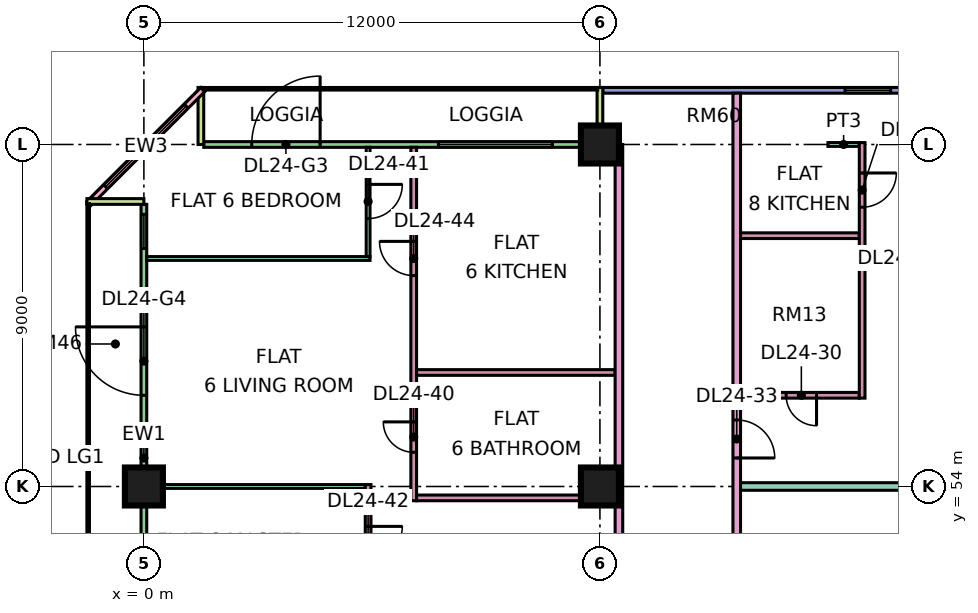
"""IFC4 building model, lengths in metres.
Left out: names, types, materials, properties, quantities, classifications, styles, units other than length and angle.
Written with IfcOpenShell. Run it as: python <this file> out.ifc"""

import sys

from ifc_helpers import new_model, si_unit, direction, frame, frame_2d, origin, origin_2d, place, context, subcontext, project, spatial, rectangle, extrude, element, fill, save


model = new_model("IFC4")
c1 = context("Model", 3, precision=1e-05, world=origin(), true_north=direction((0.0, 1.0)))
c2 = subcontext(c1, "Body", "Model", "MODEL_VIEW")
j1 = project(units=[si_unit("LENGTHUNIT", "METRE"), si_unit("PLANEANGLEUNIT", "RADIAN")], contexts=[c1])
p1 = place(None, origin())
s1 = spatial("IfcSite", under=j1, at=p1, CompositionType="ELEMENT")
p2 = place(p1, origin())
s2 = spatial("IfcBuilding", under=s1, at=p2, CompositionType="ELEMENT")
p3 = place(p2, frame((0.0, 0.0, 106.9)))
s3 = spatial("IfcBuildingStorey", under=s2, at=p3, CompositionType="ELEMENT", Elevation=106.9)
for number, where, z_axis, x_axis in (
    (1, (0.0, 54.0, 0.0), (0.0, 0.0, 1.0), (1.0, 0.0, 0.0)),
    (2, (12.0, 54.0, 0.0), (0.0, 0.0, 1.0), (1.0, 0.0, 0.0)),
    (3, (12.0, 63.0, 0.0), (0.0, 0.0, 1.0), (1.0, 0.0, 0.0)),
):
    element("IfcColumn", number, at=place(p3, frame(where, z_axis=z_axis, x_axis=x_axis)), inside=s3, PredefinedType="COLUMN", context=c2, shape_type="SweptSolid", body=[
        extrude(rectangle(XDim=1.0, YDim=1.0, at=origin_2d()), origin(), (0.0, 0.0, 1.0), 3.75),
    ])
p4 = place(p3, frame((22.5, 64.425, 0.0), z_axis=(0.0, 0.0, 1.0), x_axis=(-1.0, 0.0, 0.0)))
e4 = element("IfcWall", 4, at=p4, inside=s3, PredefinedType="SOLIDWALL", context=c2, shape_type="SweptSolid", body=[
    extrude(rectangle(XDim=10.425, YDim=0.15, at=frame_2d((5.212, 0.0))), origin(), (0.0, 0.0, 1.0), 3.35),
])
p5 = place(p4, frame((0.6, 0.0, 0.45)))
e5 = element("IfcOpeningElement", 5, at=p5, cuts=e4, PredefinedType="OPENING", context=c2, shape_type="SweptSolid", body=[
    extrude(rectangle(XDim=1.2, YDim=2.4, at=frame_2d((0.6, 1.2))), frame((0.0, 0.085, 0.0), z_axis=(0.0, -1.0, 0.0), x_axis=(1.0, 0.0, 0.0)), (0.0, 0.0, 1.0), 0.17),
])
p6 = place(p4, frame((2.85, 0.0, 0.45)))
e6 = element("IfcOpeningElement", 6, at=p6, cuts=e4, PredefinedType="OPENING", context=c2, shape_type="SweptSolid", body=[
    extrude(rectangle(XDim=1.2, YDim=2.4, at=frame_2d((0.6, 1.2))), frame((0.0, 0.085, 0.0), z_axis=(0.0, -1.0, 0.0), x_axis=(1.0, 0.0, 0.0)), (0.0, 0.0, 1.0), 0.17),
])
p7 = place(p3, frame((11.925, 63.0, 0.0), z_axis=(0.0, 0.0, 1.0), x_axis=(-1.0, 0.0, 0.0)))
e7 = element("IfcWall", 7, at=p7, inside=s3, PredefinedType="SOLIDWALL", context=c2, shape_type="SweptSolid", body=[
    extrude(rectangle(XDim=10.35, YDim=0.15, at=frame_2d((5.175, 0.0))), origin(), (0.0, 0.0, 1.0), 3.35),
])
p8 = place(p7, frame((1.175, 0.0, 0.45)))
e8 = element("IfcOpeningElement", 8, at=p8, cuts=e7, PredefinedType="OPENING", context=c2, shape_type="SweptSolid", body=[
    extrude(rectangle(XDim=3.0, YDim=2.4, at=frame_2d((1.5, 1.2))), frame((0.0, 0.085, 0.0), z_axis=(0.0, -1.0, 0.0), x_axis=(1.0, 0.0, 0.0)), (0.0, 0.0, 1.0), 0.17),
])
p9 = place(p7, frame((7.288, 0.0, 0.0)))
e9 = element("IfcOpeningElement", 9, at=p9, cuts=e7, PredefinedType="OPENING", context=c2, shape_type="SweptSolid", body=[
    extrude(rectangle(XDim=1.8, YDim=2.4, at=frame_2d((0.9, 1.2))), frame((0.0, 0.085, 0.0), z_axis=(0.0, -1.0, 0.0), x_axis=(1.0, 0.0, 0.0)), (0.0, 0.0, 1.0), 0.17),
])
for number, where, z_axis, x_axis in (
    (10, (12.0, 64.5, 0.0), (0.0, 0.0, 1.0), (0.0, -1.0, 0.0)),
    (11, (1.5, 64.5, 0.0), (0.0, 0.0, 1.0), (0.0, -1.0, 0.0)),
):
    element("IfcWall", number, at=place(p3, frame(where, z_axis=z_axis, x_axis=x_axis)), inside=s3, PredefinedType="SOLIDWALL", context=c2, shape_type="SweptSolid", body=[
        extrude(rectangle(XDim=1.5, YDim=0.15, at=frame_2d((0.75, 0.0))), origin(), (0.0, 0.0, 1.0), 3.35),
    ])
p10 = place(p3, frame((1.553, 64.447, 0.0), z_axis=(0.0, 0.0, 1.0), x_axis=(-0.707106781187, -0.707106781187, 0.0)))
e12 = element("IfcWall", 12, at=p10, inside=s3, PredefinedType="SOLIDWALL", context=c2, shape_type="SweptSolid", body=[
    extrude(rectangle(XDim=4.243, YDim=0.15, at=frame_2d((2.121, 0.0))), origin(), (0.0, 0.0, 1.0), 3.35),
])
p11 = place(p10, frame((0.621, 0.0, 0.45)))
e13 = element("IfcOpeningElement", 13, at=p11, cuts=e12, PredefinedType="OPENING", context=c2, shape_type="SweptSolid", body=[
    extrude(rectangle(XDim=3.0, YDim=2.4, at=frame_2d((1.5, 1.2))), frame((0.0, 0.085, 0.0), z_axis=(0.0, -1.0, 0.0), x_axis=(1.0, 0.0, 0.0)), (0.0, 0.0, 1.0), 0.17),
])
p12 = place(p3, frame((0.0, 61.425, 0.0), z_axis=(0.0, 0.0, 1.0), x_axis=(0.0, -1.0, 0.0)))
e14 = element("IfcWall", 14, at=p12, inside=s3, PredefinedType="SOLIDWALL", context=c2, shape_type="SweptSolid", body=[
    extrude(rectangle(XDim=13.35, YDim=0.15, at=frame_2d((6.675, 0.0))), origin(), (0.0, 0.0, 1.0), 3.35),
])
p13 = place(p12, frame((0.262, 0.0, 0.45)))
e15 = element("IfcOpeningElement", 15, at=p13, cuts=e14, PredefinedType="OPENING", context=c2, shape_type="SweptSolid", body=[
    extrude(rectangle(XDim=0.9, YDim=2.4, at=frame_2d((0.45, 1.2))), frame((0.0, 0.085, 0.0), z_axis=(0.0, -1.0, 0.0), x_axis=(1.0, 0.0, 0.0)), (0.0, 0.0, 1.0), 0.17),
])
p14 = place(p12, frame((3.225, 0.0, 0.0)))
e16 = element("IfcOpeningElement", 16, at=p14, cuts=e14, PredefinedType="OPENING", context=c2, shape_type="SweptSolid", body=[
    extrude(rectangle(XDim=1.8, YDim=2.4, at=frame_2d((0.9, 1.2))), frame((0.0, 0.085, 0.0), z_axis=(0.0, -1.0, 0.0), x_axis=(1.0, 0.0, 0.0)), (0.0, 0.0, 1.0), 0.17),
])
p15 = place(p12, frame((9.188, 0.0, 0.45)))
e17 = element("IfcOpeningElement", 17, at=p15, cuts=e14, PredefinedType="OPENING", context=c2, shape_type="SweptSolid", body=[
    extrude(rectangle(XDim=3.0, YDim=2.4, at=frame_2d((1.5, 1.2))), frame((0.0, 0.085, 0.0), z_axis=(0.0, -1.0, 0.0), x_axis=(1.0, 0.0, 0.0)), (0.0, 0.0, 1.0), 0.17),
])
p16 = place(p3, frame((-1.5, 61.5, 0.0), z_axis=(0.0, 0.0, 1.0), x_axis=(1.0, 0.0, 0.0)))
e18 = element("IfcWall", 18, at=p16, inside=s3, PredefinedType="SOLIDWALL", context=c2, shape_type="SweptSolid", body=[
    extrude(rectangle(XDim=1.5, YDim=0.15, at=frame_2d((0.75, 0.0))), origin(), (0.0, 0.0, 1.0), 3.35),
])
p17 = place(p3, frame((0.074, 54.0, 0.0), z_axis=(0.0, 0.0, 1.0), x_axis=(1.0, 0.0, 0.0)))
e19 = element("IfcWall", 19, at=p17, inside=s3, PredefinedType="PARTITIONING", context=c2, shape_type="SweptSolid", body=[
    extrude(rectangle(XDim=5.751, YDim=0.1, at=frame_2d((2.875, 0.0))), origin(), (0.0, 0.0, 1.0), 3.35),
])
p18 = place(p3, frame((0.074, 60.0, 0.0), z_axis=(0.0, 0.0, 1.0), x_axis=(1.0, 0.0, 0.0)))
e20 = element("IfcWall", 20, at=p18, inside=s3, PredefinedType="PARTITIONING", context=c2, shape_type="SweptSolid", body=[
    extrude(rectangle(XDim=5.876, YDim=0.1, at=frame_2d((2.938, 0.0))), origin(), (0.0, 0.0, 1.0), 3.35),
])
p19 = place(p3, frame((5.9, 48.1, 0.0), z_axis=(0.0, 0.0, 1.0), x_axis=(0.0, 1.0, 0.0)))
e21 = element("IfcWall", 21, at=p19, inside=s3, PredefinedType="PARTITIONING", context=c2, shape_type="SweptSolid", body=[
    extrude(rectangle(XDim=5.95, YDim=0.15, at=frame_2d((2.975, 0.0))), origin(), (0.0, 0.0, 1.0), 3.35),
])
p20 = place(p19, frame((3.95, 0.0, 0.0)))
e22 = element("IfcOpeningElement", 22, at=p20, cuts=e21, PredefinedType="OPENING", context=c2, shape_type="SweptSolid", body=[
    extrude(rectangle(XDim=0.9, YDim=2.1, at=frame_2d((0.45, 1.05))), frame((0.0, 0.085, 0.0), z_axis=(0.0, -1.0, 0.0), x_axis=(1.0, 0.0, 0.0)), (0.0, 0.0, 1.0), 0.17),
])
p21 = place(p3, frame((5.9, 60.05, 0.0), z_axis=(0.0, 0.0, 1.0), x_axis=(0.0, 1.0, 0.0)))
e23 = element("IfcWall", 23, at=p21, inside=s3, PredefinedType="PARTITIONING", context=c2, shape_type="SweptSolid", body=[
    extrude(rectangle(XDim=2.876, YDim=0.1, at=frame_2d((1.438, 0.0))), origin(), (0.0, 0.0, 1.0), 3.35),
])
p22 = place(p21, frame((1.0, 0.0, 0.0)))
e24 = element("IfcOpeningElement", 24, at=p22, cuts=e23, PredefinedType="OPENING", context=c2, shape_type="SweptSolid", body=[
    extrude(rectangle(XDim=0.9, YDim=2.1, at=frame_2d((0.45, 1.05))), frame((0.0, 0.06, 0.0), z_axis=(0.0, -1.0, 0.0), x_axis=(1.0, 0.0, 0.0)), (0.0, 0.0, 1.0), 0.12),
])
p23 = place(p3, frame((7.1, 53.625, 0.0), z_axis=(0.0, 0.0, 1.0), x_axis=(0.0, 1.0, 0.0)))
e25 = element("IfcWall", 25, at=p23, inside=s3, PredefinedType="PARTITIONING", context=c2, shape_type="SweptSolid", body=[
    extrude(rectangle(XDim=9.301, YDim=0.15, at=frame_2d((4.65, 0.0))), origin(), (0.0, 0.0, 1.0), 3.35),
])
p24 = place(p23, frame((1.275, 0.0, 0.0)))
e26 = element("IfcOpeningElement", 26, at=p24, cuts=e25, PredefinedType="OPENING", context=c2, shape_type="SweptSolid", body=[
    extrude(rectangle(XDim=0.8, YDim=2.1, at=frame_2d((0.4, 1.05))), frame((0.0, 0.085, 0.0), z_axis=(0.0, -1.0, 0.0), x_axis=(1.0, 0.0, 0.0)), (0.0, 0.0, 1.0), 0.17),
])
p25 = place(p23, frame((5.925, 0.0, 0.0)))
e27 = element("IfcOpeningElement", 27, at=p25, cuts=e25, PredefinedType="OPENING", context=c2, shape_type="SweptSolid", body=[
    extrude(rectangle(XDim=0.9, YDim=2.1, at=frame_2d((0.45, 1.05))), frame((0.0, 0.085, 0.0), z_axis=(0.0, -1.0, 0.0), x_axis=(1.0, 0.0, 0.0)), (0.0, 0.0, 1.0), 0.17),
])
for number, where, z_axis, x_axis in (
    (28, (7.175, 53.7, 0.0), (0.0, 0.0, 1.0), (1.0, 0.0, 0.0)),
    (29, (7.175, 57.0, 0.0), (0.0, 0.0, 1.0), (1.0, 0.0, 0.0)),
):
    element("IfcWall", number, at=place(p3, frame(where, z_axis=z_axis, x_axis=x_axis)), inside=s3, PredefinedType="PARTITIONING", context=c2, shape_type="SweptSolid", body=[
        extrude(rectangle(XDim=5.225, YDim=0.15, at=frame_2d((2.612, 0.0))), origin(), (0.0, 0.0, 1.0), 3.35),
    ])
p26 = place(p3, frame((12.5, 20.0, 0.0), z_axis=(0.0, 0.0, 1.0), x_axis=(0.0, 1.0, 0.0)))
e30 = element("IfcWall", 30, at=p26, inside=s3, PredefinedType="PARTITIONING", context=c2, shape_type="SweptSolid", body=[
    extrude(rectangle(XDim=43.0, YDim=0.2, at=frame_2d((21.5, 0.0))), origin(), (0.0, 0.0, 1.0), 3.35),
])
p27 = place(p26, frame((25.95, 0.0, 0.0)))
e31 = element("IfcOpeningElement", 31, at=p27, cuts=e30, PredefinedType="OPENING", context=c2, shape_type="SweptSolid", body=[
    extrude(rectangle(XDim=1.0, YDim=2.1, at=frame_2d((0.5, 1.05))), frame((0.0, 0.11, 0.0), z_axis=(0.0, -1.0, 0.0), x_axis=(1.0, 0.0, 0.0)), (0.0, 0.0, 1.0), 0.22),
])
p28 = place(p26, frame((29.25, 0.0, 0.0)))
e32 = element("IfcOpeningElement", 32, at=p28, cuts=e30, PredefinedType="OPENING", context=c2, shape_type="SweptSolid", body=[
    extrude(rectangle(XDim=1.0, YDim=2.1, at=frame_2d((0.5, 1.05))), frame((0.0, 0.11, 0.0), z_axis=(0.0, -1.0, 0.0), x_axis=(1.0, 0.0, 0.0)), (0.0, 0.0, 1.0), 0.22),
])
p29 = place(p26, frame((0.6, 0.0, 0.0)))
e33 = element("IfcOpeningElement", 33, at=p29, cuts=e30, PredefinedType="OPENING", context=c2, shape_type="SweptSolid", body=[
    extrude(rectangle(XDim=1.2, YDim=2.1, at=frame_2d((0.6, 1.05))), frame((0.0, 0.11, 0.0), z_axis=(0.0, -1.0, 0.0), x_axis=(1.0, 0.0, 0.0)), (0.0, 0.0, 1.0), 0.22),
])
p30 = place(p26, frame((4.65, 0.0, 0.0)))
e34 = element("IfcOpeningElement", 34, at=p30, cuts=e30, PredefinedType="OPENING", context=c2, shape_type="SweptSolid", body=[
    extrude(rectangle(XDim=1.0, YDim=2.1, at=frame_2d((0.5, 1.05))), frame((0.0, 0.11, 0.0), z_axis=(0.0, -1.0, 0.0), x_axis=(1.0, 0.0, 0.0)), (0.0, 0.0, 1.0), 0.22),
])
p31 = place(p3, frame((15.6, 51.225, 0.0), z_axis=(0.0, 0.0, 1.0), x_axis=(0.0, 1.0, 0.0)))
e35 = element("IfcWall", 35, at=p31, inside=s3, PredefinedType="PARTITIONING", context=c2, shape_type="SweptSolid", body=[
    extrude(rectangle(XDim=13.125, YDim=0.2, at=frame_2d((6.562, 0.0))), origin(), (0.0, 0.0, 1.0), 3.35),
])
p32 = place(p31, frame((3.525, 0.0, 0.0)))
e36 = element("IfcOpeningElement", 36, at=p32, cuts=e35, PredefinedType="OPENING", context=c2, shape_type="SweptSolid", body=[
    extrude(rectangle(XDim=1.0, YDim=2.1, at=frame_2d((0.5, 1.05))), frame((0.0, 0.11, 0.0), z_axis=(0.0, -1.0, 0.0), x_axis=(1.0, 0.0, 0.0)), (0.0, 0.0, 1.0), 0.22),
])
p33 = place(p3, frame((15.7, 54.0, 0.0), z_axis=(0.0, 0.0, 1.0), x_axis=(1.0, 0.0, 0.0)))
e37 = element("IfcWall", 37, at=p33, inside=s3, PredefinedType="PARTITIONING", context=c2, shape_type="SweptSolid", body=[
    extrude(rectangle(XDim=8.226, YDim=0.2, at=frame_2d((4.113, 0.0))), origin(), (0.0, 0.0, 1.0), 3.35),
])
p34 = place(p3, frame((15.7, 56.4, 0.0), z_axis=(0.0, 0.0, 1.0), x_axis=(1.0, 0.0, 0.0)))
e38 = element("IfcWall", 38, at=p34, inside=s3, PredefinedType="PARTITIONING", context=c2, shape_type="SweptSolid", body=[
    extrude(rectangle(XDim=3.125, YDim=0.15, at=frame_2d((1.562, 0.0))), origin(), (0.0, 0.0, 1.0), 3.35),
])
p35 = place(p34, frame((1.2, 0.0, 0.0)))
e39 = element("IfcOpeningElement", 39, at=p35, cuts=e38, PredefinedType="OPENING", context=c2, shape_type="SweptSolid", body=[
    extrude(rectangle(XDim=0.8, YDim=2.1, at=frame_2d((0.4, 1.05))), frame((0.0, 0.085, 0.0), z_axis=(0.0, -1.0, 0.0), x_axis=(1.0, 0.0, 0.0)), (0.0, 0.0, 1.0), 0.17),
])
p36 = place(p3, frame((15.7, 60.6, 0.0), z_axis=(0.0, 0.0, 1.0), x_axis=(1.0, 0.0, 0.0)))
e40 = element("IfcWall", 40, at=p36, inside=s3, PredefinedType="PARTITIONING", context=c2, shape_type="SweptSolid", body=[
    extrude(rectangle(XDim=3.125, YDim=0.15, at=frame_2d((1.562, 0.0))), origin(), (0.0, 0.0, 1.0), 3.35),
])
p37 = place(p3, frame((18.0, 63.0, 0.0), z_axis=(0.0, 0.0, 1.0), x_axis=(1.0, 0.0, 0.0)))
e41 = element("IfcWall", 41, at=p37, inside=s3, PredefinedType="PARTITIONING", context=c2, shape_type="SweptSolid", body=[
    extrude(rectangle(XDim=0.825, YDim=0.1, at=frame_2d((0.413, 0.0))), origin(), (0.0, 0.0, 1.0), 3.35),
])
p38 = place(p3, frame((18.9, 56.325, 0.0), z_axis=(0.0, 0.0, 1.0), x_axis=(0.0, 1.0, 0.0)))
e42 = element("IfcWall", 42, at=p38, inside=s3, PredefinedType="PARTITIONING", context=c2, shape_type="SweptSolid", body=[
    extrude(rectangle(XDim=6.725, YDim=0.15, at=frame_2d((3.363, 0.0))), origin(), (0.0, 0.0, 1.0), 3.35),
])
p39 = place(p38, frame((5.025, 0.0, 0.0)))
e43 = element("IfcOpeningElement", 43, at=p39, cuts=e42, PredefinedType="OPENING", context=c2, shape_type="SweptSolid", body=[
    extrude(rectangle(XDim=0.9, YDim=2.1, at=frame_2d((0.45, 1.05))), frame((0.0, 0.085, 0.0), z_axis=(0.0, -1.0, 0.0), x_axis=(1.0, 0.0, 0.0)), (0.0, 0.0, 1.0), 0.17),
])
p40 = place(p6, origin())
e44 = element("IfcWindow", 44, at=p40, inside=s3, PartitioningType="SINGLE_PANEL", PredefinedType="WINDOW", context=c2, shape_type="SweptSolid", body=[
    extrude(rectangle(XDim=1.2, YDim=2.4, at=frame_2d((0.6, 1.2))), frame((0.0, 0.03, 0.0), z_axis=(0.0, -1.0, 0.0), x_axis=(1.0, 0.0, 0.0)), (0.0, 0.0, 1.0), 0.06),
])
fill(e6, e44)
p41 = place(p8, origin())
e45 = element("IfcWindow", 45, at=p41, inside=s3, PartitioningType="SINGLE_PANEL", PredefinedType="WINDOW", context=c2, shape_type="SweptSolid", body=[
    extrude(rectangle(XDim=3.0, YDim=2.4, at=frame_2d((1.5, 1.2))), frame((0.0, 0.03, 0.0), z_axis=(0.0, -1.0, 0.0), x_axis=(1.0, 0.0, 0.0)), (0.0, 0.0, 1.0), 0.06),
])
fill(e8, e45)
p42 = place(p9, frame((1.8, 0.0, 0.0), z_axis=(0.0, 0.0, 1.0), x_axis=(-1.0, 0.0, 0.0)))
e46 = element("IfcDoor", 46, at=p42, inside=s3, OperationType="DOUBLE_DOOR_SINGLE_SWING", PredefinedType="DOOR", context=c2, shape_type="SweptSolid", body=[
    extrude(rectangle(XDim=1.8, YDim=2.4, at=frame_2d((0.9, 1.2))), frame((0.0, 0.025, 0.0), z_axis=(0.0, -1.0, 0.0), x_axis=(1.0, 0.0, 0.0)), (0.0, 0.0, 1.0), 0.05),
])
fill(e9, e46)
p43 = place(p11, origin())
e47 = element("IfcWindow", 47, at=p43, inside=s3, PartitioningType="SINGLE_PANEL", PredefinedType="WINDOW", context=c2, shape_type="SweptSolid", body=[
    extrude(rectangle(XDim=3.0, YDim=2.4, at=frame_2d((1.5, 1.2))), frame((0.0, 0.03, 0.0), z_axis=(0.0, -1.0, 0.0), x_axis=(1.0, 0.0, 0.0)), (0.0, 0.0, 1.0), 0.06),
])
fill(e13, e47)
p44 = place(p13, origin())
e48 = element("IfcWindow", 48, at=p44, inside=s3, PartitioningType="SINGLE_PANEL", PredefinedType="WINDOW", context=c2, shape_type="SweptSolid", body=[
    extrude(rectangle(XDim=0.9, YDim=2.4, at=frame_2d((0.45, 1.2))), frame((0.0, 0.03, 0.0), z_axis=(0.0, -1.0, 0.0), x_axis=(1.0, 0.0, 0.0)), (0.0, 0.0, 1.0), 0.06),
])
fill(e15, e48)
p45 = place(p14, frame((1.8, 0.0, 0.0), z_axis=(0.0, 0.0, 1.0), x_axis=(-1.0, 0.0, 0.0)))
e49 = element("IfcDoor", 49, at=p45, inside=s3, OperationType="DOUBLE_DOOR_SINGLE_SWING", PredefinedType="DOOR", context=c2, shape_type="SweptSolid", body=[
    extrude(rectangle(XDim=1.8, YDim=2.4, at=frame_2d((0.9, 1.2))), frame((0.0, 0.025, 0.0), z_axis=(0.0, -1.0, 0.0), x_axis=(1.0, 0.0, 0.0)), (0.0, 0.0, 1.0), 0.05),
])
fill(e16, e49)
p46 = place(p35, origin())
e50 = element("IfcDoor", 50, at=p46, inside=s3, OperationType="SINGLE_SWING_RIGHT", PredefinedType="DOOR", context=c2, shape_type="SweptSolid", body=[
    extrude(rectangle(XDim=0.8, YDim=2.1, at=frame_2d((0.4, 1.05))), frame((0.0, 0.025, 0.0), z_axis=(0.0, -1.0, 0.0), x_axis=(1.0, 0.0, 0.0)), (0.0, 0.0, 1.0), 0.05),
])
fill(e39, e50)
p47 = place(p39, origin())
e51 = element("IfcDoor", 51, at=p47, inside=s3, OperationType="SINGLE_SWING_RIGHT", PredefinedType="DOOR", context=c2, shape_type="SweptSolid", body=[
    extrude(rectangle(XDim=0.9, YDim=2.1, at=frame_2d((0.45, 1.05))), frame((0.0, 0.025, 0.0), z_axis=(0.0, -1.0, 0.0), x_axis=(1.0, 0.0, 0.0)), (0.0, 0.0, 1.0), 0.05),
])
fill(e43, e51)
p48 = place(p32, frame((1.0, 0.0, 0.0), z_axis=(0.0, 0.0, 1.0), x_axis=(-1.0, 0.0, 0.0)))
e52 = element("IfcDoor", 52, at=p48, inside=s3, OperationType="SINGLE_SWING_LEFT", PredefinedType="DOOR", context=c2, shape_type="SweptSolid", body=[
    extrude(rectangle(XDim=1.0, YDim=2.1, at=frame_2d((0.5, 1.05))), frame((0.0, 0.025, 0.0), z_axis=(0.0, -1.0, 0.0), x_axis=(1.0, 0.0, 0.0)), (0.0, 0.0, 1.0), 0.05),
])
fill(e36, e52)
p49 = place(p24, frame((0.8, 0.0, 0.0), z_axis=(0.0, 0.0, 1.0), x_axis=(-1.0, 0.0, 0.0)))
e53 = element("IfcDoor", 53, at=p49, inside=s3, OperationType="SINGLE_SWING_RIGHT", PredefinedType="DOOR", context=c2, shape_type="SweptSolid", body=[
    extrude(rectangle(XDim=0.8, YDim=2.1, at=frame_2d((0.4, 1.05))), frame((0.0, 0.025, 0.0), z_axis=(0.0, -1.0, 0.0), x_axis=(1.0, 0.0, 0.0)), (0.0, 0.0, 1.0), 0.05),
])
fill(e26, e53)
p50 = place(p22, origin())
e54 = element("IfcDoor", 54, at=p50, inside=s3, OperationType="SINGLE_SWING_RIGHT", PredefinedType="DOOR", context=c2, shape_type="SweptSolid", body=[
    extrude(rectangle(XDim=0.9, YDim=2.1, at=frame_2d((0.45, 1.05))), frame((0.0, 0.025, 0.0), z_axis=(0.0, -1.0, 0.0), x_axis=(1.0, 0.0, 0.0)), (0.0, 0.0, 1.0), 0.05),
])
fill(e24, e54)
p51 = place(p20, origin())
e55 = element("IfcDoor", 55, at=p51, inside=s3, OperationType="SINGLE_SWING_RIGHT", PredefinedType="DOOR", context=c2, shape_type="SweptSolid", body=[
    extrude(rectangle(XDim=0.9, YDim=2.1, at=frame_2d((0.45, 1.05))), frame((0.0, 0.025, 0.0), z_axis=(0.0, -1.0, 0.0), x_axis=(1.0, 0.0, 0.0)), (0.0, 0.0, 1.0), 0.05),
])
fill(e22, e55)
p52 = place(p25, frame((0.9, 0.0, 0.0), z_axis=(0.0, 0.0, 1.0), x_axis=(-1.0, 0.0, 0.0)))
e56 = element("IfcDoor", 56, at=p52, inside=s3, OperationType="SINGLE_SWING_RIGHT", PredefinedType="DOOR", context=c2, shape_type="SweptSolid", body=[
    extrude(rectangle(XDim=0.9, YDim=2.1, at=frame_2d((0.45, 1.05))), frame((0.0, 0.025, 0.0), z_axis=(0.0, -1.0, 0.0), x_axis=(1.0, 0.0, 0.0)), (0.0, 0.0, 1.0), 0.05),
])
fill(e27, e56)
save(model, sys.argv[1])
